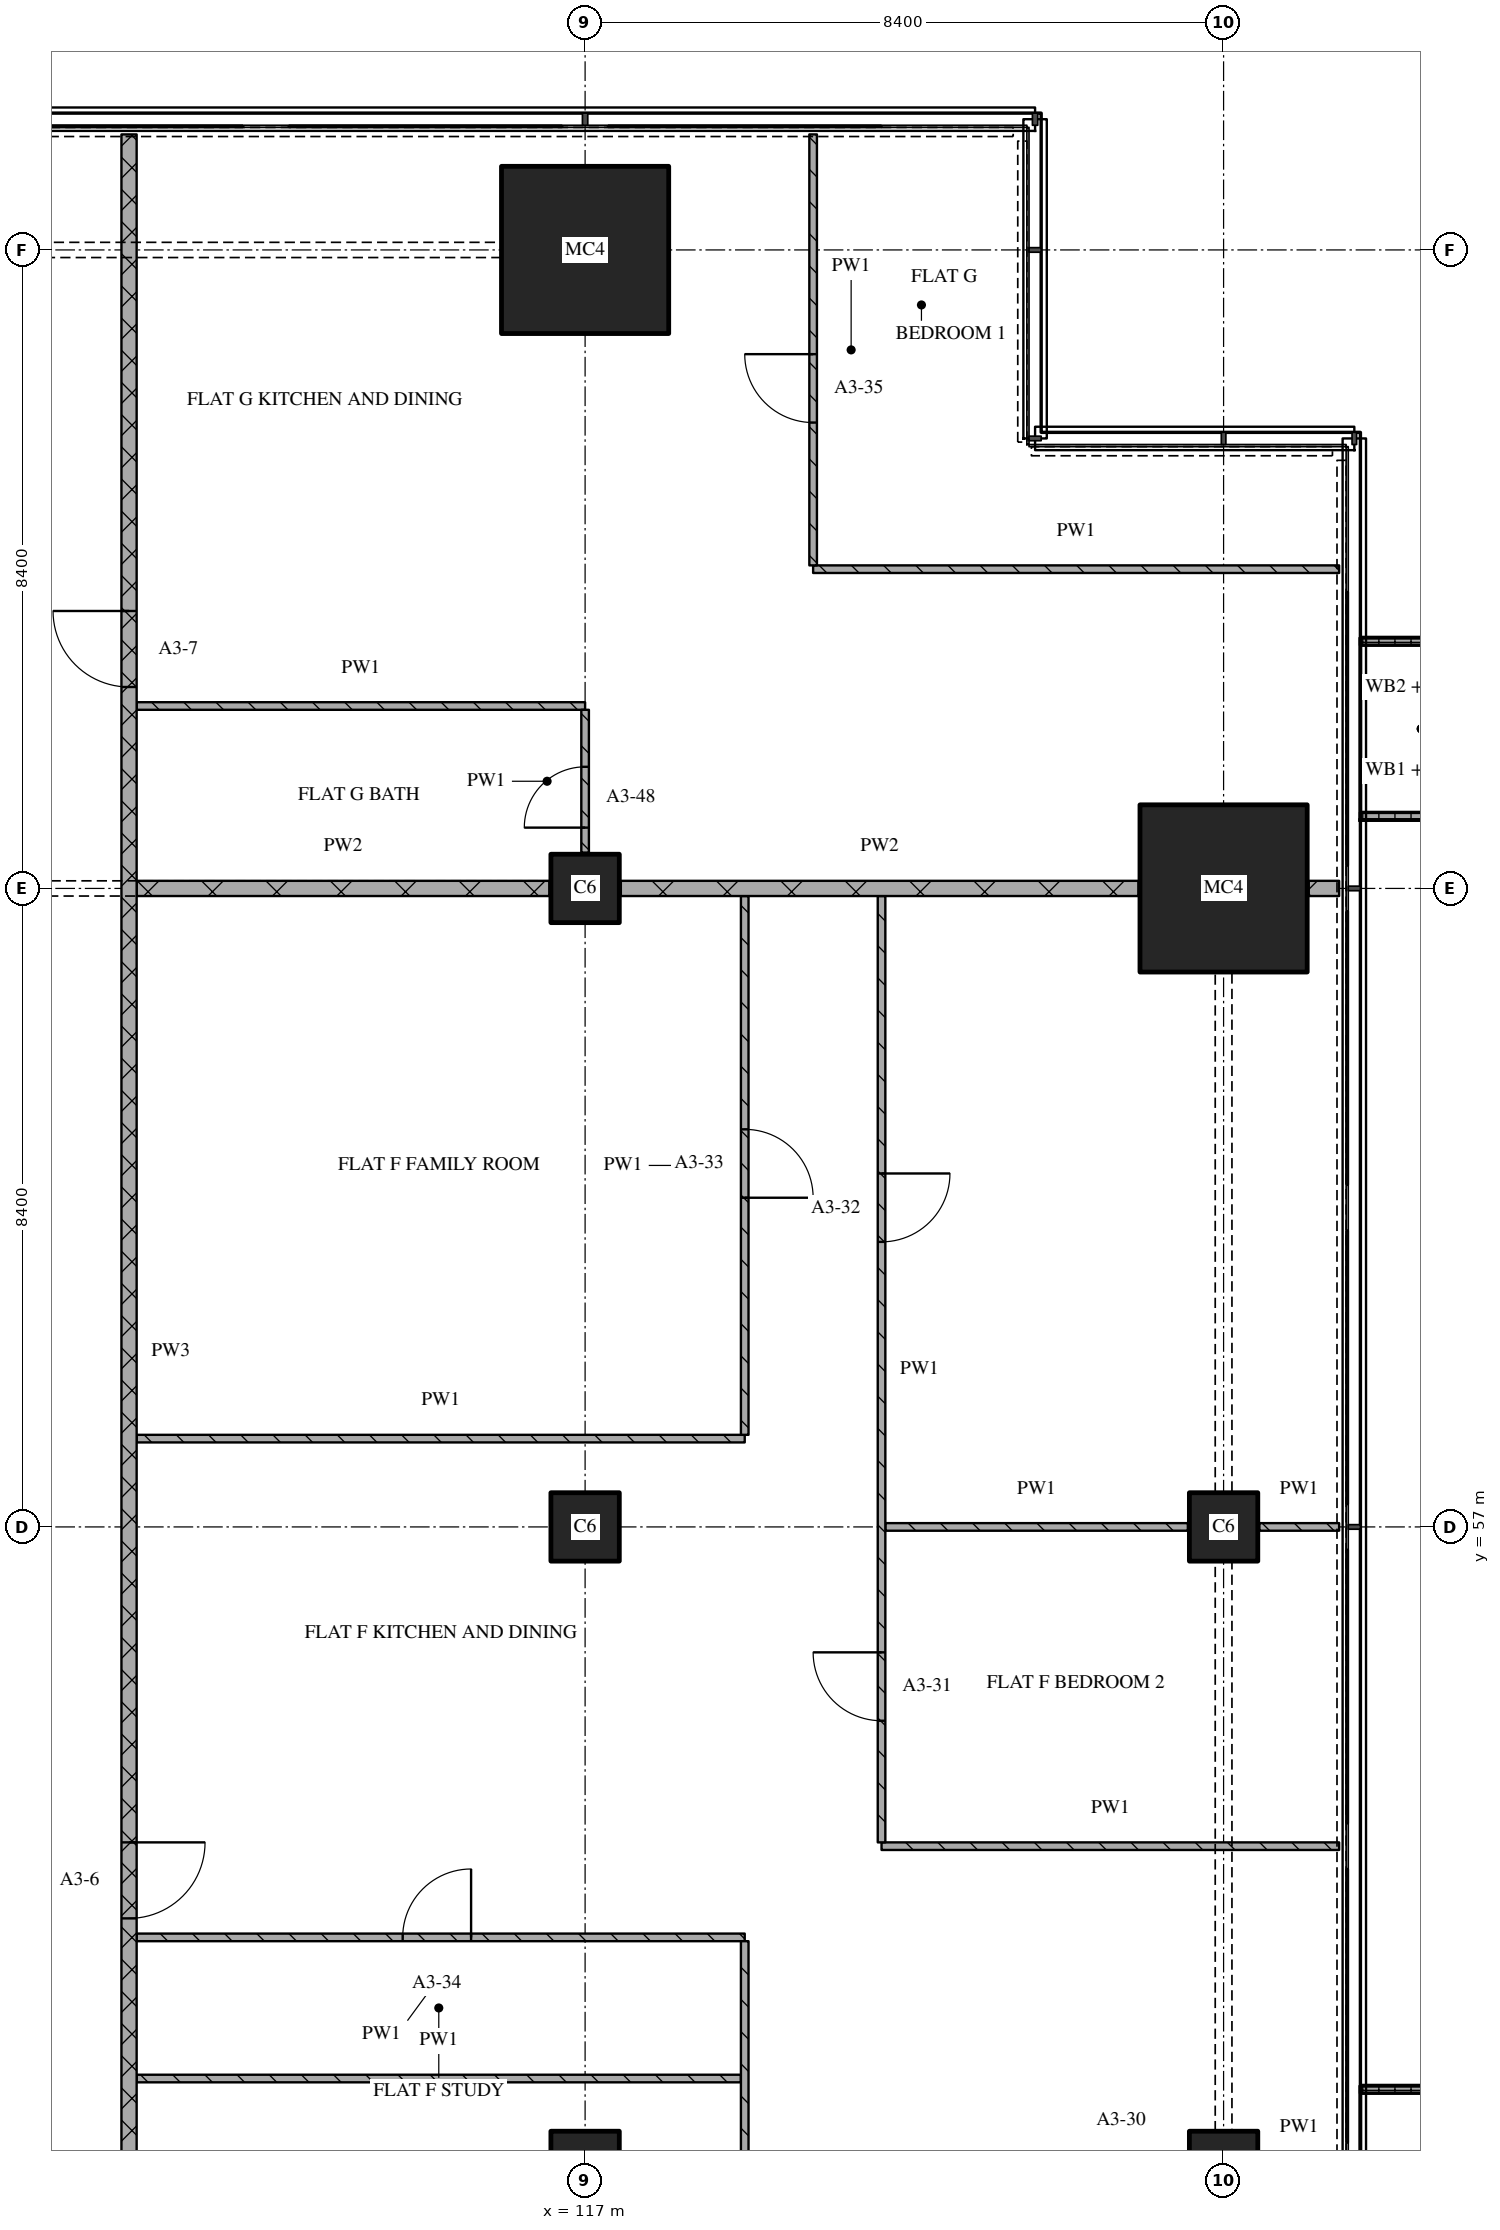
"""IFC4 building model, lengths in metres.
Left out: names, types, materials, properties, quantities, classifications, styles, units other than length and angle.
Written with IfcOpenShell. Run it as: python <this file> out.ifc"""

import sys

from ifc_helpers import new_model, si_unit, direction, frame, frame_2d, origin, origin_2d, place, context, subcontext, project, spatial, polyline, rectangle, outline, extrude, element, fill, save


model = new_model("IFC4")
c1 = context("Model", 3, precision=1e-05, world=origin(), true_north=direction((0.0, 1.0)))
c2 = subcontext(c1, "Body", "Model", "MODEL_VIEW")
j1 = project(units=[si_unit("LENGTHUNIT", "METRE"), si_unit("PLANEANGLEUNIT", "RADIAN")], contexts=[c1])
p1 = place(None, origin())
s1 = spatial("IfcSite", under=j1, at=p1, CompositionType="ELEMENT")
p2 = place(p1, origin())
s2 = spatial("IfcBuilding", under=s1, at=p2, CompositionType="ELEMENT")
p3 = place(p2, frame((0.0, 0.0, 62.4)))
s3 = spatial("IfcBuildingStorey", under=s2, at=p3, CompositionType="ELEMENT", Elevation=62.4)
for number, where, z_axis, x_axis in (
    (1, (117.0, 48.6, 0.0), (0.0, 0.0, 1.0), (1.0, 0.0, 0.0)),
    (2, (117.0, 57.0, 0.0), (0.0, 0.0, 1.0), (1.0, 0.0, 0.0)),
    (3, (117.0, 65.4, 0.0), (0.0, 0.0, 1.0), (1.0, 0.0, 0.0)),
):
    element("IfcColumn", number, at=place(p3, frame(where, z_axis=z_axis, x_axis=x_axis)), inside=s3, PredefinedType="COLUMN", context=c2, shape_type="SweptSolid", body=[
        extrude(rectangle(XDim=0.9, YDim=0.9, at=origin_2d()), origin(), (0.0, 0.0, 1.0), 3.6),
    ])
p4 = place(p3, frame((117.0, 73.8, 0.0), z_axis=(0.0, 0.0, 1.0), x_axis=(1.0, 0.0, 0.0)))
e4 = element("IfcColumn", 4, at=p4, inside=s3, PredefinedType="COLUMN", context=c2, shape_type="SweptSolid", body=[
    extrude(rectangle(XDim=2.2, YDim=2.2, at=origin_2d()), origin(), (0.0, 0.0, 1.0), 3.6),
])
for number, where, z_axis, x_axis in (
    (5, (125.4, 48.6, 0.0), (0.0, 0.0, 1.0), (1.0, 0.0, 0.0)),
    (6, (125.4, 57.0, 0.0), (0.0, 0.0, 1.0), (1.0, 0.0, 0.0)),
):
    element("IfcColumn", number, at=place(p3, frame(where, z_axis=z_axis, x_axis=x_axis)), inside=s3, PredefinedType="COLUMN", context=c2, shape_type="SweptSolid", body=[
        extrude(rectangle(XDim=0.9, YDim=0.9, at=origin_2d()), origin(), (0.0, 0.0, 1.0), 3.6),
    ])
p5 = place(p3, frame((125.4, 65.4, 0.0), z_axis=(0.0, 0.0, 1.0), x_axis=(1.0, 0.0, 0.0)))
e7 = element("IfcColumn", 7, at=p5, inside=s3, PredefinedType="COLUMN", context=c2, shape_type="SweptSolid", body=[
    extrude(rectangle(XDim=2.2, YDim=2.2, at=origin_2d()), origin(), (0.0, 0.0, 1.0), 3.6),
])
p6 = place(p3, origin())
e8 = element("IfcWall", 8, at=p6, inside=s3, PredefinedType="SOLIDWALL", context=c2, shape_type="SweptSolid", body=[
    extrude(outline(polyline([(127.2, 43.35), (127.2, 43.45), (128.967, 43.45), (128.967, 49.55), (127.2, 49.55), (127.2, 49.65), (129.067, 49.65), (129.067, 43.35), (127.2, 43.35)])), origin(), (0.0, 0.0, 1.0), 1.0),
])
p7 = place(p3, origin())
e9 = element("IfcWall", 9, at=p7, inside=s3, PredefinedType="SOLIDWALL", context=c2, shape_type="SweptSolid", body=[
    extrude(outline(polyline([(127.2, 66.3), (127.2, 66.4), (128.7, 66.4), (128.7, 68.6), (127.2, 68.6), (127.2, 68.7), (128.8, 68.7), (128.8, 66.3), (127.2, 66.3)])), origin(), (0.0, 0.0, 1.0), 1.0),
])
p8 = place(p3, frame((111.1, 49.743, 0.0), z_axis=(0.0, 0.0, 1.0), x_axis=(1.0, 0.0, 0.0)))
e10 = element("IfcWall", 10, at=p8, inside=s3, PredefinedType="PARTITIONING", context=c2, shape_type="SweptSolid", body=[
    extrude(rectangle(XDim=7.95, YDim=0.1, at=frame_2d((3.975, 0.0))), origin(), (0.0, 0.0, 1.0), 3.32),
])
p9 = place(p3, frame((119.1, 51.6, 0.0), z_axis=(0.0, 0.0, 1.0), x_axis=(-1.0, 0.0, 0.0)))
e11 = element("IfcWall", 11, at=p9, inside=s3, PredefinedType="PARTITIONING", context=c2, shape_type="SweptSolid", body=[
    extrude(rectangle(XDim=8.0, YDim=0.1, at=frame_2d((4.0, 0.0))), origin(), (0.0, 0.0, 1.0), 3.32),
])
p10 = place(p9, frame((3.6, 0.0, 0.0)))
e12 = element("IfcOpeningElement", 12, at=p10, cuts=e11, PredefinedType="OPENING", context=c2, shape_type="SweptSolid", body=[
    extrude(rectangle(XDim=0.9, YDim=2.1, at=frame_2d((0.45, 1.05))), frame((0.0, 0.06, 0.0), z_axis=(0.0, -1.0, 0.0), x_axis=(1.0, 0.0, 0.0)), (0.0, 0.0, 1.0), 0.12),
])
p11 = place(p3, frame((120.9, 52.8, 0.0), z_axis=(0.0, 0.0, 1.0), x_axis=(1.0, 0.0, 0.0)))
e13 = element("IfcWall", 13, at=p11, inside=s3, PredefinedType="PARTITIONING", context=c2, shape_type="SweptSolid", body=[
    extrude(rectangle(XDim=6.02, YDim=0.1, at=frame_2d((3.01, 0.0))), origin(), (0.0, 0.0, 1.0), 3.32),
])
p12 = place(p3, frame((120.95, 57.0, 0.0), z_axis=(0.0, 0.0, 1.0), x_axis=(1.0, 0.0, 0.0)))
e14 = element("IfcWall", 14, at=p12, inside=s3, PredefinedType="PARTITIONING", context=c2, shape_type="SweptSolid", body=[
    extrude(rectangle(XDim=3.98, YDim=0.1, at=frame_2d((1.99, 0.0))), origin(), (0.0, 0.0, 1.0), 3.32),
])
p13 = place(p3, frame((125.87, 57.0, 0.0), z_axis=(0.0, 0.0, 1.0), x_axis=(1.0, 0.0, 0.0)))
e15 = element("IfcWall", 15, at=p13, inside=s3, PredefinedType="PARTITIONING", context=c2, shape_type="SweptSolid", body=[
    extrude(rectangle(XDim=1.05, YDim=0.1, at=frame_2d((0.525, 0.0))), origin(), (0.0, 0.0, 1.0), 3.32),
])
p14 = place(p3, frame((111.1, 58.162, 0.0), z_axis=(0.0, 0.0, 1.0), x_axis=(1.0, 0.0, 0.0)))
e16 = element("IfcWall", 16, at=p14, inside=s3, PredefinedType="PARTITIONING", context=c2, shape_type="SweptSolid", body=[
    extrude(rectangle(XDim=8.0, YDim=0.1, at=frame_2d((4.0, 0.0))), origin(), (0.0, 0.0, 1.0), 3.32),
])
p15 = place(p3, frame((111.1, 65.4, 0.0), z_axis=(0.0, 0.0, 1.0), x_axis=(1.0, 0.0, 0.0)))
e17 = element("IfcWall", 17, at=p15, inside=s3, PredefinedType="PARTITIONING", context=c2, shape_type="SweptSolid", body=[
    extrude(rectangle(XDim=5.43, YDim=0.2, at=frame_2d((2.715, 0.0))), origin(), (0.0, 0.0, 1.0), 2.82),
])
p16 = place(p3, frame((117.47, 65.4, 0.0), z_axis=(0.0, 0.0, 1.0), x_axis=(1.0, 0.0, 0.0)))
e18 = element("IfcWall", 18, at=p16, inside=s3, PredefinedType="PARTITIONING", context=c2, shape_type="SweptSolid", body=[
    extrude(rectangle(XDim=6.81, YDim=0.2, at=frame_2d((3.405, 0.0))), origin(), (0.0, 0.0, 1.0), 3.32),
])
p17 = place(p3, frame((126.52, 65.4, 0.0), z_axis=(0.0, 0.0, 1.0), x_axis=(1.0, 0.0, 0.0)))
e19 = element("IfcWall", 19, at=p17, inside=s3, PredefinedType="PARTITIONING", context=c2, shape_type="SweptSolid", body=[
    extrude(rectangle(XDim=0.4, YDim=0.2, at=frame_2d((0.2, 0.0))), origin(), (0.0, 0.0, 1.0), 3.32),
])
p18 = place(p3, frame((111.1, 67.8, 0.0), z_axis=(0.0, 0.0, 1.0), x_axis=(1.0, 0.0, 0.0)))
e20 = element("IfcWall", 20, at=p18, inside=s3, PredefinedType="PARTITIONING", context=c2, shape_type="SweptSolid", body=[
    extrude(rectangle(XDim=5.9, YDim=0.1, at=frame_2d((2.95, 0.0))), origin(), (0.0, 0.0, 1.0), 3.32),
])
p19 = place(p3, frame((120.0, 69.6, 0.0), z_axis=(0.0, 0.0, 1.0), x_axis=(1.0, 0.0, 0.0)))
e21 = element("IfcWall", 21, at=p19, inside=s3, PredefinedType="PARTITIONING", context=c2, shape_type="SweptSolid", body=[
    extrude(rectangle(XDim=6.92, YDim=0.1, at=frame_2d((3.46, 0.0))), origin(), (0.0, 0.0, 1.0), 3.32),
])
p20 = place(p3, frame((111.0, 75.32, 0.0), z_axis=(0.0, 0.0, 1.0), x_axis=(0.0, -1.0, 0.0)))
e22 = element("IfcWall", 22, at=p20, inside=s3, PredefinedType="PARTITIONING", context=c2, shape_type="SweptSolid", body=[
    extrude(rectangle(XDim=32.02, YDim=0.2, at=frame_2d((16.01, 0.0))), origin(), (0.0, 0.0, 1.0), 3.32),
])
p21 = place(p20, frame((6.27, 0.0, 0.0)))
e23 = element("IfcOpeningElement", 23, at=p21, cuts=e22, PredefinedType="OPENING", context=c2, shape_type="SweptSolid", body=[
    extrude(rectangle(XDim=1.0, YDim=2.1, at=frame_2d((0.5, 1.05))), frame((0.0, 0.11, 0.0), z_axis=(0.0, -1.0, 0.0), x_axis=(1.0, 0.0, 0.0)), (0.0, 0.0, 1.0), 0.22),
])
p22 = place(p20, frame((22.47, 0.0, 0.0)))
e24 = element("IfcOpeningElement", 24, at=p22, cuts=e22, PredefinedType="OPENING", context=c2, shape_type="SweptSolid", body=[
    extrude(rectangle(XDim=1.0, YDim=2.1, at=frame_2d((0.5, 1.05))), frame((0.0, 0.11, 0.0), z_axis=(0.0, -1.0, 0.0), x_axis=(1.0, 0.0, 0.0)), (0.0, 0.0, 1.0), 0.22),
])
p23 = place(p3, frame((117.0, 65.87, 0.0), z_axis=(0.0, 0.0, 1.0), x_axis=(0.0, 1.0, 0.0)))
e25 = element("IfcWall", 25, at=p23, inside=s3, PredefinedType="PARTITIONING", context=c2, shape_type="SweptSolid", body=[
    extrude(rectangle(XDim=1.88, YDim=0.1, at=frame_2d((0.94, 0.0))), origin(), (0.0, 0.0, 1.0), 3.32),
])
p24 = place(p23, frame((0.33, 0.0, 0.0)))
e26 = element("IfcOpeningElement", 26, at=p24, cuts=e25, PredefinedType="OPENING", context=c2, shape_type="SweptSolid", body=[
    extrude(rectangle(XDim=0.8, YDim=2.1, at=frame_2d((0.4, 1.05))), frame((0.0, 0.06, 0.0), z_axis=(0.0, -1.0, 0.0), x_axis=(1.0, 0.0, 0.0)), (0.0, 0.0, 1.0), 0.12),
])
p25 = place(p3, frame((119.1, 43.3, 0.0), z_axis=(0.0, 0.0, 1.0), x_axis=(0.0, 1.0, 0.0)))
e27 = element("IfcWall", 27, at=p25, inside=s3, PredefinedType="PARTITIONING", context=c2, shape_type="SweptSolid", body=[
    extrude(rectangle(XDim=8.25, YDim=0.1, at=frame_2d((4.125, 0.0))), origin(), (0.0, 0.0, 1.0), 3.32),
])
p26 = place(p25, frame((1.136, 0.0, 0.0)))
e28 = element("IfcOpeningElement", 28, at=p26, cuts=e27, PredefinedType="OPENING", context=c2, shape_type="SweptSolid", body=[
    extrude(rectangle(XDim=0.8, YDim=2.1, at=frame_2d((0.4, 1.05))), frame((0.0, 0.06, 0.0), z_axis=(0.0, -1.0, 0.0), x_axis=(1.0, 0.0, 0.0)), (0.0, 0.0, 1.0), 0.12),
])
p27 = place(p25, frame((4.407, 0.0, 0.0)))
e29 = element("IfcOpeningElement", 29, at=p27, cuts=e27, PredefinedType="OPENING", context=c2, shape_type="SweptSolid", body=[
    extrude(rectangle(XDim=0.8, YDim=2.1, at=frame_2d((0.4, 1.05))), frame((0.0, 0.06, 0.0), z_axis=(0.0, -1.0, 0.0), x_axis=(1.0, 0.0, 0.0)), (0.0, 0.0, 1.0), 0.12),
])
p28 = place(p3, frame((119.1, 58.212, 0.0), z_axis=(0.0, 0.0, 1.0), x_axis=(0.0, 1.0, 0.0)))
e30 = element("IfcWall", 30, at=p28, inside=s3, PredefinedType="PARTITIONING", context=c2, shape_type="SweptSolid", body=[
    extrude(rectangle(XDim=7.088, YDim=0.1, at=frame_2d((3.544, 0.0))), origin(), (0.0, 0.0, 1.0), 3.32),
])
p29 = place(p28, frame((3.119, 0.0, 0.0)))
e31 = element("IfcOpeningElement", 31, at=p29, cuts=e30, PredefinedType="OPENING", context=c2, shape_type="SweptSolid", body=[
    extrude(rectangle(XDim=0.9, YDim=2.1, at=frame_2d((0.45, 1.05))), frame((0.0, 0.06, 0.0), z_axis=(0.0, -1.0, 0.0), x_axis=(1.0, 0.0, 0.0)), (0.0, 0.0, 1.0), 0.12),
])
p30 = place(p3, frame((120.0, 75.32, 0.0), z_axis=(0.0, 0.0, 1.0), x_axis=(0.0, -1.0, 0.0)))
e32 = element("IfcWall", 32, at=p30, inside=s3, PredefinedType="PARTITIONING", context=c2, shape_type="SweptSolid", body=[
    extrude(rectangle(XDim=5.67, YDim=0.1, at=frame_2d((2.835, 0.0))), origin(), (0.0, 0.0, 1.0), 3.32),
])
p31 = place(p30, frame((2.891, 0.0, 0.0)))
e33 = element("IfcOpeningElement", 33, at=p31, cuts=e32, PredefinedType="OPENING", context=c2, shape_type="SweptSolid", body=[
    extrude(rectangle(XDim=0.9, YDim=2.1, at=frame_2d((0.45, 1.05))), frame((0.0, 0.06, 0.0), z_axis=(0.0, -1.0, 0.0), x_axis=(1.0, 0.0, 0.0)), (0.0, 0.0, 1.0), 0.12),
])
p32 = place(p3, frame((120.9, 65.3, 0.0), z_axis=(0.0, 0.0, 1.0), x_axis=(0.0, -1.0, 0.0)))
e34 = element("IfcWall", 34, at=p32, inside=s3, PredefinedType="PARTITIONING", context=c2, shape_type="SweptSolid", body=[
    extrude(rectangle(XDim=12.45, YDim=0.1, at=frame_2d((6.225, 0.0))), origin(), (0.0, 0.0, 1.0), 3.32),
])
p33 = place(p32, frame((3.65, 0.0, 0.0)))
e35 = element("IfcOpeningElement", 35, at=p33, cuts=e34, PredefinedType="OPENING", context=c2, shape_type="SweptSolid", body=[
    extrude(rectangle(XDim=0.9, YDim=2.1, at=frame_2d((0.45, 1.05))), frame((0.0, 0.06, 0.0), z_axis=(0.0, -1.0, 0.0), x_axis=(1.0, 0.0, 0.0)), (0.0, 0.0, 1.0), 0.12),
])
p34 = place(p32, frame((9.95, 0.0, 0.0)))
e36 = element("IfcOpeningElement", 36, at=p34, cuts=e34, PredefinedType="OPENING", context=c2, shape_type="SweptSolid", body=[
    extrude(rectangle(XDim=0.9, YDim=2.1, at=frame_2d((0.45, 1.05))), frame((0.0, 0.06, 0.0), z_axis=(0.0, -1.0, 0.0), x_axis=(1.0, 0.0, 0.0)), (0.0, 0.0, 1.0), 0.12),
])
p35 = place(p10, origin())
e37 = element("IfcDoor", 37, at=p35, inside=s3, OperationType="SINGLE_SWING_RIGHT", PredefinedType="DOOR", context=c2, shape_type="SweptSolid", body=[
    extrude(rectangle(XDim=0.9, YDim=2.1, at=frame_2d((0.45, 1.05))), frame((0.0, 0.025, 0.0), z_axis=(0.0, -1.0, 0.0), x_axis=(1.0, 0.0, 0.0)), (0.0, 0.0, 1.0), 0.05),
])
fill(e12, e37)
p36 = place(p21, origin())
e38 = element("IfcDoor", 38, at=p36, inside=s3, OperationType="SINGLE_SWING_RIGHT", PredefinedType="DOOR", context=c2, shape_type="SweptSolid", body=[
    extrude(rectangle(XDim=1.0, YDim=2.1, at=frame_2d((0.5, 1.05))), frame((0.0, 0.025, 0.0), z_axis=(0.0, -1.0, 0.0), x_axis=(1.0, 0.0, 0.0)), (0.0, 0.0, 1.0), 0.05),
])
fill(e23, e38)
p37 = place(p22, origin())
e39 = element("IfcDoor", 39, at=p37, inside=s3, OperationType="SINGLE_SWING_LEFT", PredefinedType="DOOR", context=c2, shape_type="SweptSolid", body=[
    extrude(rectangle(XDim=1.0, YDim=2.1, at=frame_2d((0.5, 1.05))), frame((0.0, 0.025, 0.0), z_axis=(0.0, -1.0, 0.0), x_axis=(1.0, 0.0, 0.0)), (0.0, 0.0, 1.0), 0.05),
])
fill(e24, e39)
p38 = place(p24, origin())
e40 = element("IfcDoor", 40, at=p38, inside=s3, OperationType="SINGLE_SWING_LEFT", PredefinedType="DOOR", context=c2, shape_type="SweptSolid", body=[
    extrude(rectangle(XDim=0.8, YDim=2.1, at=frame_2d((0.4, 1.05))), frame((0.0, 0.025, 0.0), z_axis=(0.0, -1.0, 0.0), x_axis=(1.0, 0.0, 0.0)), (0.0, 0.0, 1.0), 0.05),
])
fill(e26, e40)
p39 = place(p29, origin())
e41 = element("IfcDoor", 41, at=p39, inside=s3, OperationType="SINGLE_SWING_RIGHT", PredefinedType="DOOR", context=c2, shape_type="SweptSolid", body=[
    extrude(rectangle(XDim=0.9, YDim=2.1, at=frame_2d((0.45, 1.05))), frame((0.0, 0.025, 0.0), z_axis=(0.0, -1.0, 0.0), x_axis=(1.0, 0.0, 0.0)), (0.0, 0.0, 1.0), 0.05),
])
fill(e31, e41)
p40 = place(p31, origin())
e42 = element("IfcDoor", 42, at=p40, inside=s3, OperationType="SINGLE_SWING_RIGHT", PredefinedType="DOOR", context=c2, shape_type="SweptSolid", body=[
    extrude(rectangle(XDim=0.9, YDim=2.1, at=frame_2d((0.45, 1.05))), frame((0.0, 0.025, 0.0), z_axis=(0.0, -1.0, 0.0), x_axis=(1.0, 0.0, 0.0)), (0.0, 0.0, 1.0), 0.05),
])
fill(e33, e42)
p41 = place(p33, origin())
e43 = element("IfcDoor", 43, at=p41, inside=s3, OperationType="SINGLE_SWING_LEFT", PredefinedType="DOOR", context=c2, shape_type="SweptSolid", body=[
    extrude(rectangle(XDim=0.9, YDim=2.1, at=frame_2d((0.45, 1.05))), frame((0.0, 0.025, 0.0), z_axis=(0.0, -1.0, 0.0), x_axis=(1.0, 0.0, 0.0)), (0.0, 0.0, 1.0), 0.05),
])
fill(e35, e43)
p42 = place(p34, origin())
e44 = element("IfcDoor", 44, at=p42, inside=s3, OperationType="SINGLE_SWING_RIGHT", PredefinedType="DOOR", context=c2, shape_type="SweptSolid", body=[
    extrude(rectangle(XDim=0.9, YDim=2.1, at=frame_2d((0.45, 1.05))), frame((0.0, 0.025, 0.0), z_axis=(0.0, -1.0, 0.0), x_axis=(1.0, 0.0, 0.0)), (0.0, 0.0, 1.0), 0.05),
])
fill(e36, e44)
save(model, sys.argv[1])
